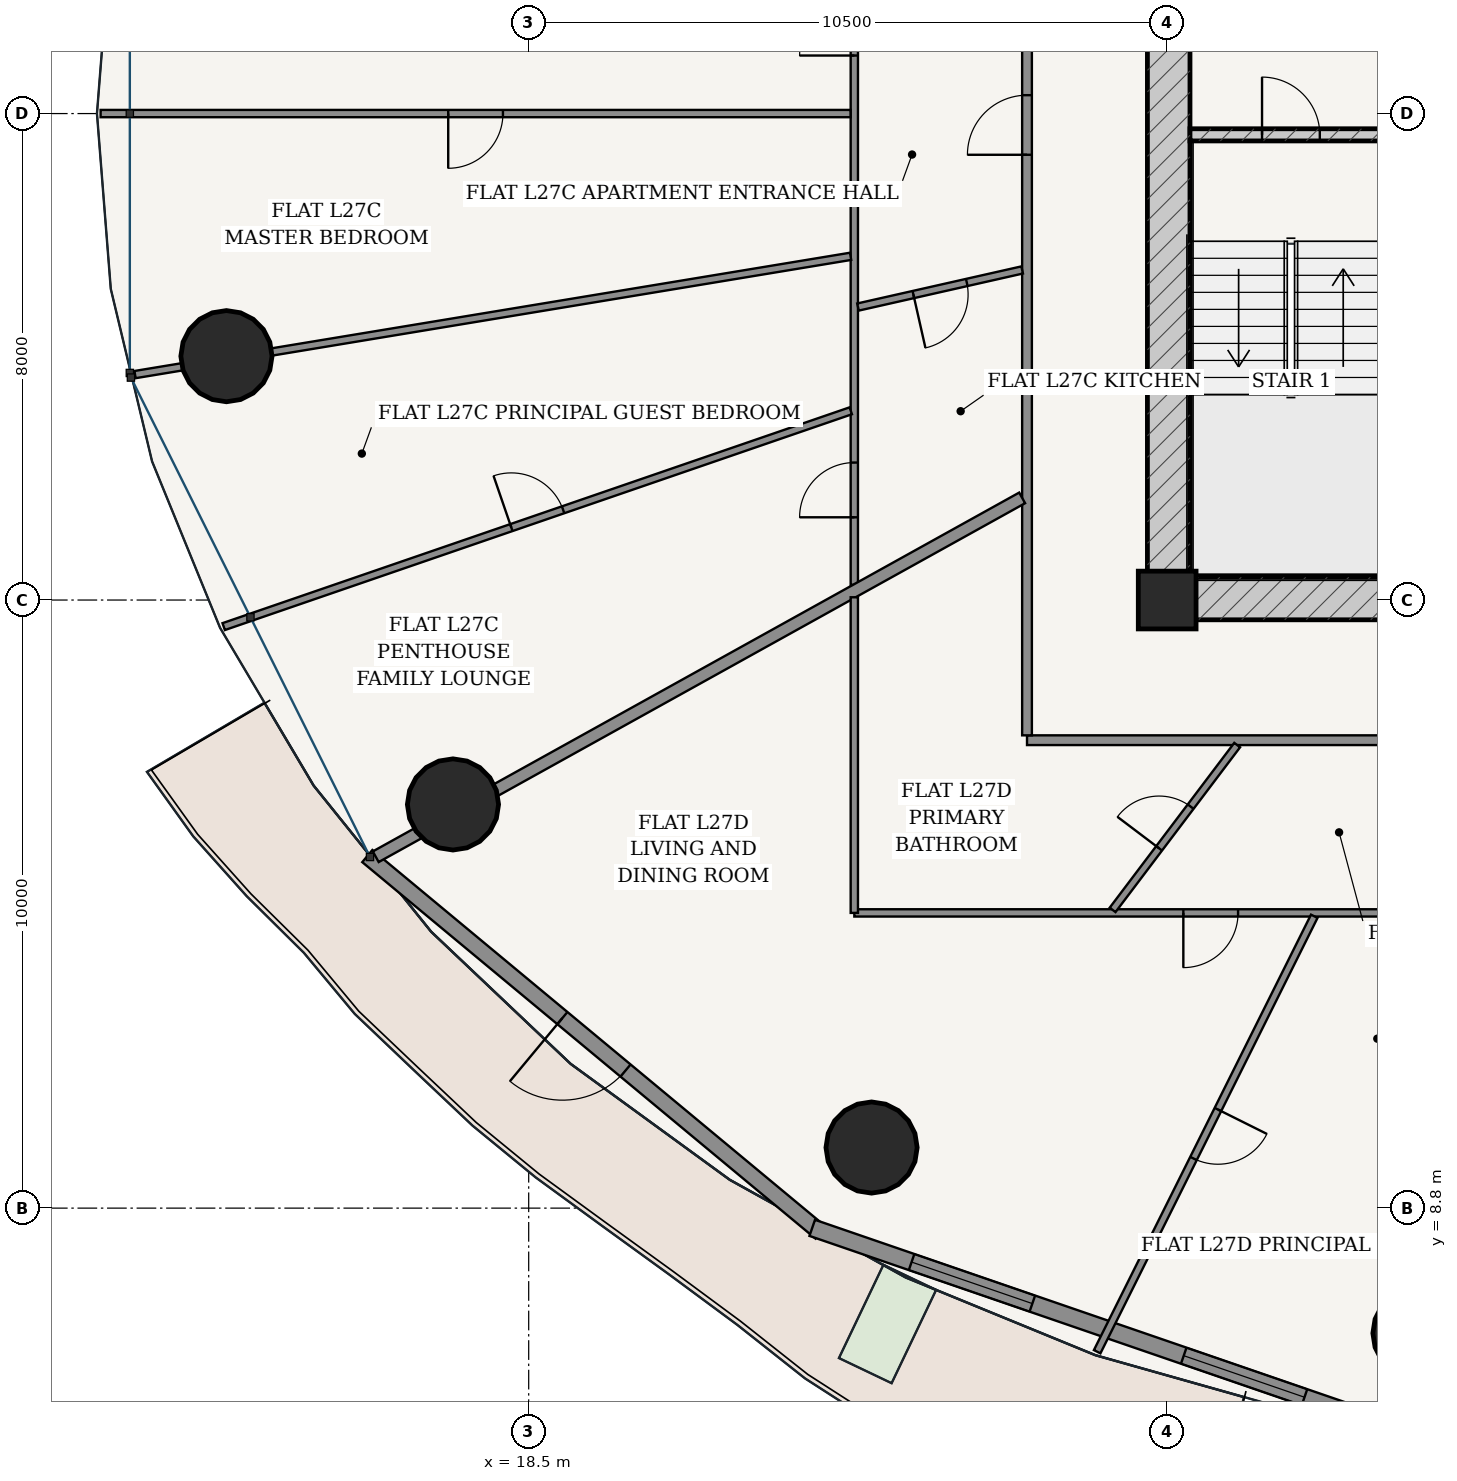
"""IFC4 building model, lengths in metres.
Left out: names, types, materials, properties, quantities, classifications, styles, units other than length and angle.
Written with IfcOpenShell. Run it as: python <this file> out.ifc"""

import sys

from ifc_helpers import new_model, si_unit, direction, frame, frame_2d, origin, origin_2d, place, context, subcontext, project, spatial, rectangle, hollow_circle, extrude, source, transform, mapped, element, fill, save


model = new_model("IFC4")
c1 = context("Model", 3, precision=1e-05, world=origin(), true_north=direction((-0.2419218956, 0.970295726276)))
c2 = subcontext(c1, "Body", "Model", "MODEL_VIEW")
j1 = project(units=[si_unit("LENGTHUNIT", "METRE"), si_unit("PLANEANGLEUNIT", "RADIAN")], contexts=[c1])
p1 = place(None, origin())
s1 = spatial("IfcSite", under=j1, at=p1, CompositionType="ELEMENT")
p2 = place(p1, origin())
s2 = spatial("IfcBuilding", under=s1, at=p2, CompositionType="ELEMENT")
p3 = place(p2, frame((0.0, 0.0, 105.0)))
s3 = spatial("IfcBuildingStorey", under=s2, at=p3, CompositionType="ELEMENT", Elevation=105.0)
p4 = place(p3, frame((29.0, 18.8, 0.0), z_axis=(0.0, 0.0, 1.0), x_axis=(1.0, 0.0, 0.0)))
e1 = element("IfcColumn", 1, at=p4, inside=s3, PredefinedType="COLUMN", context=c2, shape_type="SweptSolid", body=[
    extrude(rectangle(XDim=0.95, YDim=0.95, at=origin_2d()), origin(), (0.0, 0.0, 1.0), 3.6),
])
p5 = place(p3, frame((28.675, 18.825, 0.0), z_axis=(0.0, 0.0, 1.0), x_axis=(1.0, 0.0, 0.0)))
e2 = element("IfcWall", 2, at=p5, inside=s3, PredefinedType="SHEAR", context=c2, shape_type="SweptSolid", body=[
    extrude(rectangle(XDim=18.65, YDim=0.7, at=frame_2d((9.325, 0.0))), origin(), (0.0, 0.0, 1.0), 3.325),
])
p6 = place(p5, frame((6.877, 0.0, 0.0)))
e3 = element("IfcOpeningElement", 3, at=p6, cuts=e2, PredefinedType="OPENING", context=c2, shape_type="SweptSolid", body=[
    extrude(rectangle(XDim=0.85, YDim=2.1, at=frame_2d((0.425, 1.05))), frame((0.0, 0.36, 0.0), z_axis=(0.0, -1.0, 0.0), x_axis=(1.0, 0.0, 0.0)), (0.0, 0.0, 1.0), 0.72),
])
p7 = place(p5, frame((8.9, 0.0, 0.0)))
e4 = element("IfcOpeningElement", 4, at=p7, cuts=e2, PredefinedType="OPENING", context=c2, shape_type="SweptSolid", body=[
    extrude(rectangle(XDim=0.85, YDim=2.1, at=frame_2d((0.425, 1.05))), frame((0.0, 0.36, 0.0), z_axis=(0.0, -1.0, 0.0), x_axis=(1.0, 0.0, 0.0)), (0.0, 0.0, 1.0), 0.72),
])
p8 = place(p5, frame((10.923, 0.0, 0.0)))
e5 = element("IfcOpeningElement", 5, at=p8, cuts=e2, PredefinedType="OPENING", context=c2, shape_type="SweptSolid", body=[
    extrude(rectangle(XDim=0.85, YDim=2.1, at=frame_2d((0.425, 1.05))), frame((0.0, 0.36, 0.0), z_axis=(0.0, -1.0, 0.0), x_axis=(1.0, 0.0, 0.0)), (0.0, 0.0, 1.0), 0.72),
])
p9 = place(p3, frame((29.025, 19.175, 0.0), z_axis=(0.0, 0.0, 1.0), x_axis=(0.0, 1.0, 0.0)))
e6 = element("IfcWall", 6, at=p9, inside=s3, PredefinedType="SHEAR", context=c2, shape_type="SweptSolid", body=[
    extrude(rectangle(XDim=15.25, YDim=0.7, at=frame_2d((7.625, 0.0))), origin(), (0.0, 0.0, 1.0), 3.325),
])
p10 = place(p9, frame((9.875, 0.0, 0.0)))
e7 = element("IfcOpeningElement", 7, at=p10, cuts=e6, PredefinedType="OPENING", context=c2, shape_type="SweptSolid", body=[
    extrude(rectangle(XDim=1.5, YDim=2.2, at=frame_2d((0.75, 1.1))), frame((0.0, 0.36, 0.0), z_axis=(0.0, -1.0, 0.0), x_axis=(1.0, 0.0, 0.0)), (0.0, 0.0, 1.0), 0.72),
])
p11 = place(p3, frame((29.375, 26.45, 0.0), z_axis=(0.0, 0.0, 1.0), x_axis=(1.0, 0.0, 0.0)))
e8 = element("IfcWall", 8, at=p11, inside=s3, PredefinedType="SOLIDWALL", context=c2, shape_type="SweptSolid", body=[
    extrude(rectangle(XDim=3.32, YDim=0.2, at=frame_2d((1.66, 0.0))), origin(), (0.0, 0.0, 1.0), 3.325),
])
p12 = place(p11, frame((1.185, 0.0, 0.0)))
e9 = element("IfcOpeningElement", 9, at=p12, cuts=e8, PredefinedType="OPENING", context=c2, shape_type="SweptSolid", body=[
    extrude(rectangle(XDim=0.95, YDim=2.15, at=frame_2d((0.475, 1.075))), frame((0.0, 0.11, 0.0), z_axis=(0.0, -1.0, 0.0), x_axis=(1.0, 0.0, 0.0)), (0.0, 0.0, 1.0), 0.22),
])
for number, where, z_axis, x_axis in (
    (10, (13.529, 22.81, 0.0), (0.0, 0.0, 1.0), (1.0, 0.0, 0.0)),
    (11, (17.255, 15.438, 0.0), (0.0, 0.0, 1.0), (1.0, 0.0, 0.0)),
    (12, (24.138, 9.796, 0.0), (0.0, 0.0, 1.0), (1.0, 0.0, 0.0)),
    (13, (33.133, 6.743, 0.0), (0.0, 0.0, 1.0), (1.0, 0.0, 0.0)),
):
    element("IfcColumn", number, at=place(p3, frame(where, z_axis=z_axis, x_axis=x_axis)), inside=s3, PredefinedType="COLUMN", context=c2, shape_type="SweptSolid", body=[
        extrude(hollow_circle(Radius=0.75, WallThickness=0.045, at=origin_2d()), origin(), (0.0, 0.0, 1.0), 3.6),
    ])
p13 = place(p3, frame((15.846, 14.59, 0.0), z_axis=(0.0, 0.0, 1.0), x_axis=(0.769254958887, -0.638941944333, 0.0)))
e14 = element("IfcWall", 14, at=p13, inside=s3, PredefinedType="SOLIDWALL", context=c2, shape_type="SweptSolid", body=[
    extrude(rectangle(XDim=9.69, YDim=0.26, at=frame_2d((4.845, 0.0))), origin(), (0.0, 0.0, 1.0), 3.325),
])
p14 = place(p13, frame((4.17, 0.0, 0.0)))
e15 = element("IfcOpeningElement", 15, at=p14, cuts=e14, PredefinedType="OPENING", context=c2, shape_type="SweptSolid", body=[
    extrude(rectangle(XDim=1.35, YDim=2.2, at=frame_2d((0.675, 1.1))), frame((0.0, 0.14, 0.0), z_axis=(0.0, -1.0, 0.0), x_axis=(1.0, 0.0, 0.0)), (0.0, 0.0, 1.0), 0.28),
])
p15 = place(p3, frame((23.163, 8.476, 0.0), z_axis=(0.0, 0.0, 1.0), x_axis=(0.945590132341, -0.325360264351, 0.0)))
e16 = element("IfcWall", 16, at=p15, inside=s3, PredefinedType="SOLIDWALL", context=c2, shape_type="SweptSolid", body=[
    extrude(rectangle(XDim=10.289, YDim=0.28, at=frame_2d((5.145, 0.0))), origin(), (0.0, 0.0, 1.0), 3.325),
])
p16 = place(p15, frame((1.728, 0.0, 0.85)))
e17 = element("IfcOpeningElement", 17, at=p16, cuts=e16, PredefinedType="OPENING", context=c2, shape_type="SweptSolid", body=[
    extrude(rectangle(XDim=2.1, YDim=1.95, at=frame_2d((1.05, 0.975))), frame((0.0, 0.15, 0.0), z_axis=(0.0, -1.0, 0.0), x_axis=(1.0, 0.0, 0.0)), (0.0, 0.0, 1.0), 0.3),
])
p17 = place(p15, frame((6.461, 0.0, 0.85)))
e18 = element("IfcOpeningElement", 18, at=p17, cuts=e16, PredefinedType="OPENING", context=c2, shape_type="SweptSolid", body=[
    extrude(rectangle(XDim=2.1, YDim=1.95, at=frame_2d((1.05, 0.975))), frame((0.0, 0.15, 0.0), z_axis=(0.0, -1.0, 0.0), x_axis=(1.0, 0.0, 0.0)), (0.0, 0.0, 1.0), 0.3),
])
p18 = place(p3, frame((26.695, 16.495, 0.0), z_axis=(0.0, 0.0, 1.0), x_axis=(1.0, 0.0, 0.0)))
e19 = element("IfcWall", 19, at=p18, inside=s3, PredefinedType="PARTITIONING", context=c2, shape_type="SweptSolid", body=[
    extrude(rectangle(XDim=22.61, YDim=0.16, at=frame_2d((11.305, 0.0))), origin(), (0.0, 0.0, 1.0), 2.767),
])
p19 = place(p18, frame((6.974, 0.0, 0.0)))
e20 = element("IfcOpeningElement", 20, at=p19, cuts=e19, PredefinedType="OPENING", context=c2, shape_type="SweptSolid", body=[
    extrude(rectangle(XDim=0.98, YDim=2.2, at=frame_2d((0.49, 1.1))), frame((0.0, 0.09, 0.0), z_axis=(0.0, -1.0, 0.0), x_axis=(1.0, 0.0, 0.0)), (0.0, 0.0, 1.0), 0.18),
])
p20 = place(p18, frame((18.922, 0.0, 0.0)))
e21 = element("IfcOpeningElement", 21, at=p20, cuts=e19, PredefinedType="OPENING", context=c2, shape_type="SweptSolid", body=[
    extrude(rectangle(XDim=0.98, YDim=2.2, at=frame_2d((0.49, 1.1))), frame((0.0, 0.09, 0.0), z_axis=(0.0, -1.0, 0.0), x_axis=(1.0, 0.0, 0.0)), (0.0, 0.0, 1.0), 0.18),
])
p21 = place(p3, frame((26.695, 16.575, 0.0), z_axis=(0.0, 0.0, 1.0), x_axis=(0.0, 1.0, 0.0)))
e22 = element("IfcWall", 22, at=p21, inside=s3, PredefinedType="PARTITIONING", context=c2, shape_type="SweptSolid", body=[
    extrude(rectangle(XDim=20.45, YDim=0.16, at=frame_2d((10.225, 0.0))), origin(), (0.0, 0.0, 1.0), 2.767),
])
p22 = place(p21, frame((9.547, 0.0, 0.0)))
e23 = element("IfcOpeningElement", 23, at=p22, cuts=e22, PredefinedType="OPENING", context=c2, shape_type="SweptSolid", body=[
    extrude(rectangle(XDim=0.98, YDim=2.2, at=frame_2d((0.49, 1.1))), frame((0.0, 0.09, 0.0), z_axis=(0.0, -1.0, 0.0), x_axis=(1.0, 0.0, 0.0)), (0.0, 0.0, 1.0), 0.18),
])
p23 = place(p3, frame((23.855, 19.05, 0.0), z_axis=(0.0, 0.0, 1.0), x_axis=(0.0, 1.0, 0.0)))
e24 = element("IfcWall", 24, at=p23, inside=s3, PredefinedType="PARTITIONING", context=c2, shape_type="SweptSolid", body=[
    extrude(rectangle(XDim=15.501, YDim=0.12, at=frame_2d((7.75, 0.0))), origin(), (0.0, 0.0, 1.0), 2.767),
])
p24 = place(p23, frame((8.705, 0.0, 0.0)))
e25 = element("IfcOpeningElement", 25, at=p24, cuts=e24, PredefinedType="OPENING", context=c2, shape_type="SweptSolid", body=[
    extrude(rectangle(XDim=0.9, YDim=2.15, at=frame_2d((0.45, 1.075))), frame((0.0, 0.07, 0.0), z_axis=(0.0, -1.0, 0.0), x_axis=(1.0, 0.0, 0.0)), (0.0, 0.0, 1.0), 0.14),
])
p25 = place(p23, frame((1.111, 0.0, 0.0)))
e26 = element("IfcOpeningElement", 26, at=p25, cuts=e24, PredefinedType="OPENING", context=c2, shape_type="SweptSolid", body=[
    extrude(rectangle(XDim=0.9, YDim=2.15, at=frame_2d((0.45, 1.075))), frame((0.0, 0.07, 0.0), z_axis=(0.0, -1.0, 0.0), x_axis=(1.0, 0.0, 0.0)), (0.0, 0.0, 1.0), 0.14),
])
p26 = place(p3, frame((23.793, 26.8, 0.0), z_axis=(0.0, 0.0, 1.0), x_axis=(-1.0, 0.0, 0.0)))
e27 = element("IfcWall", 27, at=p26, inside=s3, PredefinedType="PARTITIONING", context=c2, shape_type="SweptSolid", body=[
    extrude(rectangle(XDim=12.333, YDim=0.12, at=frame_2d((6.167, 0.0))), origin(), (0.0, 0.0, 1.0), 2.767),
])
p27 = place(p26, frame((5.717, 0.0, 0.0)))
e28 = element("IfcOpeningElement", 28, at=p27, cuts=e27, PredefinedType="OPENING", context=c2, shape_type="SweptSolid", body=[
    extrude(rectangle(XDim=0.9, YDim=2.15, at=frame_2d((0.45, 1.075))), frame((0.0, 0.07, 0.0), z_axis=(0.0, -1.0, 0.0), x_axis=(1.0, 0.0, 0.0)), (0.0, 0.0, 1.0), 0.14),
])
p28 = place(p3, frame((23.794, 24.452, 0.0), z_axis=(0.0, 0.0, 1.0), x_axis=(-0.986620350945, -0.163034607068, 0.0)))
e29 = element("IfcWall", 29, at=p28, inside=s3, PredefinedType="PARTITIONING", context=c2, shape_type="SweptSolid", body=[
    extrude(rectangle(XDim=11.927, YDim=0.12, at=frame_2d((5.964, 0.0))), origin(), (0.0, 0.0, 1.0), 2.767),
])
p29 = place(p3, frame((23.796, 21.912, 0.0), z_axis=(0.0, 0.0, 1.0), x_axis=(-0.945574063861, -0.325406960209, 0.0)))
e30 = element("IfcWall", 30, at=p29, inside=s3, PredefinedType="PARTITIONING", context=c2, shape_type="SweptSolid", body=[
    extrude(rectangle(XDim=10.906, YDim=0.12, at=frame_2d((5.453, 0.0))), origin(), (0.0, 0.0, 1.0), 2.767),
])
p30 = place(p29, frame((5.003, 0.0, 0.0)))
e31 = element("IfcOpeningElement", 31, at=p30, cuts=e30, PredefinedType="OPENING", context=c2, shape_type="SweptSolid", body=[
    extrude(rectangle(XDim=0.9, YDim=2.15, at=frame_2d((0.45, 1.075))), frame((0.0, 0.07, 0.0), z_axis=(0.0, -1.0, 0.0), x_axis=(1.0, 0.0, 0.0)), (0.0, 0.0, 1.0), 0.14),
])
p31 = place(p3, frame((26.615, 24.228, 0.0), z_axis=(0.0, 0.0, 1.0), x_axis=(-0.975417151515, -0.220366468706, 0.0)))
e32 = element("IfcWall", 32, at=p31, inside=s3, PredefinedType="PARTITIONING", context=c2, shape_type="SweptSolid", body=[
    extrude(rectangle(XDim=2.768, YDim=0.12, at=frame_2d((1.384, 0.0))), origin(), (0.0, 0.0, 1.0), 3.325),
])
p32 = place(p31, frame((0.934, 0.0, 0.0)))
e33 = element("IfcOpeningElement", 33, at=p32, cuts=e32, PredefinedType="OPENING", context=c2, shape_type="SweptSolid", body=[
    extrude(rectangle(XDim=0.9, YDim=2.15, at=frame_2d((0.45, 1.075))), frame((0.0, 0.07, 0.0), z_axis=(0.0, -1.0, 0.0), x_axis=(1.0, 0.0, 0.0)), (0.0, 0.0, 1.0), 0.14),
])
p33 = place(p3, frame((26.615, 20.48, 0.0), z_axis=(0.0, 0.0, 1.0), x_axis=(-0.874310671773, -0.48536671623, 0.0)))
e34 = element("IfcWall", 34, at=p33, inside=s3, PredefinedType="PARTITIONING", context=c2, shape_type="SweptSolid", body=[
    extrude(rectangle(XDim=12.159, YDim=0.2, at=frame_2d((6.079, 0.0))), origin(), (0.0, 0.0, 1.0), 2.767),
])
p34 = place(p3, frame((44.451, 13.655, 0.0), z_axis=(0.0, 0.0, 1.0), x_axis=(-1.0, 0.0, 0.0)))
e35 = element("IfcWall", 35, at=p34, inside=s3, PredefinedType="PARTITIONING", context=c2, shape_type="SweptSolid", body=[
    extrude(rectangle(XDim=20.596, YDim=0.12, at=frame_2d((10.298, 0.0))), origin(), (0.0, 0.0, 1.0), 2.767),
])
p35 = place(p34, frame((14.286, 0.0, 0.0)))
e36 = element("IfcOpeningElement", 36, at=p35, cuts=e35, PredefinedType="OPENING", context=c2, shape_type="SweptSolid", body=[
    extrude(rectangle(XDim=0.9, YDim=2.15, at=frame_2d((0.45, 1.075))), frame((0.0, 0.07, 0.0), z_axis=(0.0, -1.0, 0.0), x_axis=(1.0, 0.0, 0.0)), (0.0, 0.0, 1.0), 0.14),
])
p36 = place(p34, frame((2.815, 0.0, 0.0)))
e37 = element("IfcOpeningElement", 37, at=p36, cuts=e35, PredefinedType="OPENING", context=c2, shape_type="SweptSolid", body=[
    extrude(rectangle(XDim=0.9, YDim=2.15, at=frame_2d((0.45, 1.075))), frame((0.0, 0.07, 0.0), z_axis=(0.0, -1.0, 0.0), x_axis=(1.0, 0.0, 0.0)), (0.0, 0.0, 1.0), 0.14),
])
p37 = place(p3, frame((23.855, 13.655, 0.0), z_axis=(0.0, 0.0, 1.0), x_axis=(0.0, 1.0, 0.0)))
e38 = element("IfcWall", 38, at=p37, inside=s3, PredefinedType="PARTITIONING", context=c2, shape_type="SweptSolid", body=[
    extrude(rectangle(XDim=5.19, YDim=0.12, at=frame_2d((2.595, 0.0))), origin(), (0.0, 0.0, 1.0), 3.004),
])
p38 = place(p3, frame((31.419, 13.6, 0.0), z_axis=(0.0, 0.0, 1.0), x_axis=(-0.446188142997, -0.894939182877, 0.0)))
e39 = element("IfcWall", 39, at=p38, inside=s3, PredefinedType="PARTITIONING", context=c2, shape_type="SweptSolid", body=[
    extrude(rectangle(XDim=8.002, YDim=0.12, at=frame_2d((4.001, 0.0))), origin(), (0.0, 0.0, 1.0), 2.767),
])
p39 = place(p38, frame((3.551, 0.0, 0.0)))
e40 = element("IfcOpeningElement", 40, at=p39, cuts=e39, PredefinedType="OPENING", context=c2, shape_type="SweptSolid", body=[
    extrude(rectangle(XDim=0.9, YDim=2.15, at=frame_2d((0.45, 1.075))), frame((0.0, 0.07, 0.0), z_axis=(0.0, -1.0, 0.0), x_axis=(1.0, 0.0, 0.0)), (0.0, 0.0, 1.0), 0.14),
])
p40 = place(p3, frame((30.151, 16.415, 0.0), z_axis=(0.0, 0.0, 1.0), x_axis=(-0.602927617913, -0.79779589342, 0.0)))
e41 = element("IfcWall", 41, at=p40, inside=s3, PredefinedType="PARTITIONING", context=c2, shape_type="SweptSolid", body=[
    extrude(rectangle(XDim=3.398, YDim=0.12, at=frame_2d((1.699, 0.0))), origin(), (0.0, 0.0, 1.0), 3.004),
])
p41 = place(p40, frame((1.269, 0.0, 0.0)))
e42 = element("IfcOpeningElement", 42, at=p41, cuts=e41, PredefinedType="OPENING", context=c2, shape_type="SweptSolid", body=[
    extrude(rectangle(XDim=0.86, YDim=2.15, at=frame_2d((0.43, 1.075))), frame((0.0, 0.07, 0.0), z_axis=(0.0, -1.0, 0.0), x_axis=(1.0, 0.0, 0.0)), (0.0, 0.0, 1.0), 0.14),
])
m1 = source(origin(), c2, "Body", "SweptSolid", [
    extrude(rectangle(XDim=1.35, YDim=2.2, at=frame_2d((0.675, 1.1))), frame((0.0, 0.025, 0.0), z_axis=(0.0, -1.0, 0.0), x_axis=(1.0, 0.0, 0.0)), (0.0, 0.0, 1.0), 0.05),
])
p42 = place(p14, frame((1.35, 0.0, 0.0), z_axis=(0.0, 0.0, 1.0), x_axis=(-1.0, 0.0, 0.0)))
e43 = element("IfcDoor", 43, at=p42, inside=s3, OperationType="SINGLE_SWING_RIGHT", PredefinedType="DOOR", context=c2, shape_type="MappedRepresentation", body=[
    mapped(m1, transform((0.0, 0.0, 0.0), scale=1.0)),
])
fill(e15, e43)
m2 = source(origin(), c2, "Body", "SweptSolid", [
    extrude(rectangle(XDim=2.1, YDim=1.95, at=frame_2d((1.05, 0.975))), frame((0.0, 0.03, 0.0), z_axis=(0.0, -1.0, 0.0), x_axis=(1.0, 0.0, 0.0)), (0.0, 0.0, 1.0), 0.06),
])
p43 = place(p16, origin())
e44 = element("IfcWindow", 44, at=p43, inside=s3, PartitioningType="SINGLE_PANEL", PredefinedType="WINDOW", context=c2, shape_type="MappedRepresentation", body=[
    mapped(m2, transform((0.0, 0.0, 0.0), scale=1.0)),
])
fill(e17, e44)
p44 = place(p17, origin())
e45 = element("IfcWindow", 45, at=p44, inside=s3, PartitioningType="SINGLE_PANEL", PredefinedType="WINDOW", context=c2, shape_type="MappedRepresentation", body=[
    mapped(m2, transform((0.0, 0.0, 0.0), scale=1.0)),
])
fill(e18, e45)
m3 = source(origin(), c2, "Body", "SweptSolid", [
    extrude(rectangle(XDim=0.95, YDim=2.15, at=frame_2d((0.475, 1.075))), frame((0.0, 0.025, 0.0), z_axis=(0.0, -1.0, 0.0), x_axis=(1.0, 0.0, 0.0)), (0.0, 0.0, 1.0), 0.05),
])
p45 = place(p12, origin())
e46 = element("IfcDoor", 46, at=p45, inside=s3, OperationType="SINGLE_SWING_LEFT", PredefinedType="DOOR", context=c2, shape_type="MappedRepresentation", body=[
    mapped(m3, transform((0.0, 0.0, 0.0), scale=1.0)),
])
fill(e9, e46)
m4 = source(origin(), c2, "Body", "SweptSolid", [
    extrude(rectangle(XDim=0.98, YDim=2.2, at=frame_2d((0.49, 1.1))), frame((0.0, 0.025, 0.0), z_axis=(0.0, -1.0, 0.0), x_axis=(1.0, 0.0, 0.0)), (0.0, 0.0, 1.0), 0.05),
])
p46 = place(p22, origin())
e47 = element("IfcDoor", 47, at=p46, inside=s3, OperationType="SINGLE_SWING_LEFT", PredefinedType="DOOR", context=c2, shape_type="MappedRepresentation", body=[
    mapped(m4, transform((0.0, 0.0, 0.0), scale=1.0)),
])
fill(e23, e47)
m5 = source(origin(), c2, "Body", "SweptSolid", [
    extrude(rectangle(XDim=0.9, YDim=2.15, at=frame_2d((0.45, 1.075))), frame((0.0, 0.025, 0.0), z_axis=(0.0, -1.0, 0.0), x_axis=(1.0, 0.0, 0.0)), (0.0, 0.0, 1.0), 0.05),
])
p47 = place(p24, origin())
e48 = element("IfcDoor", 48, at=p47, inside=s3, OperationType="SINGLE_SWING_LEFT", PredefinedType="DOOR", context=c2, shape_type="MappedRepresentation", body=[
    mapped(m5, transform((0.0, 0.0, 0.0), scale=1.0)),
])
fill(e25, e48)
p48 = place(p32, origin())
e49 = element("IfcDoor", 49, at=p48, inside=s3, OperationType="SINGLE_SWING_RIGHT", PredefinedType="DOOR", context=c2, shape_type="MappedRepresentation", body=[
    mapped(m5, transform((0.0, 0.0, 0.0), scale=1.0)),
])
fill(e33, e49)
p49 = place(p25, origin())
e50 = element("IfcDoor", 50, at=p49, inside=s3, OperationType="SINGLE_SWING_LEFT", PredefinedType="DOOR", context=c2, shape_type="MappedRepresentation", body=[
    mapped(m5, transform((0.0, 0.0, 0.0), scale=1.0)),
])
fill(e26, e50)
p50 = place(p27, origin())
e51 = element("IfcDoor", 51, at=p50, inside=s3, OperationType="SINGLE_SWING_RIGHT", PredefinedType="DOOR", context=c2, shape_type="MappedRepresentation", body=[
    mapped(m5, transform((0.0, 0.0, 0.0), scale=1.0)),
])
fill(e28, e51)
p51 = place(p30, frame((0.9, 0.0, 0.0), z_axis=(0.0, 0.0, 1.0), x_axis=(-1.0, 0.0, 0.0)))
e52 = element("IfcDoor", 52, at=p51, inside=s3, OperationType="SINGLE_SWING_LEFT", PredefinedType="DOOR", context=c2, shape_type="MappedRepresentation", body=[
    mapped(m5, transform((0.0, 0.0, 0.0), scale=1.0)),
])
fill(e31, e52)
m6 = source(origin(), c2, "Body", "SweptSolid", [
    extrude(rectangle(XDim=0.86, YDim=2.15, at=frame_2d((0.43, 1.075))), frame((0.0, 0.025, 0.0), z_axis=(0.0, -1.0, 0.0), x_axis=(1.0, 0.0, 0.0)), (0.0, 0.0, 1.0), 0.05),
])
p52 = place(p41, frame((0.86, 0.0, 0.0), z_axis=(0.0, 0.0, 1.0), x_axis=(-1.0, 0.0, 0.0)))
e53 = element("IfcDoor", 53, at=p52, inside=s3, OperationType="SINGLE_SWING_LEFT", PredefinedType="DOOR", context=c2, shape_type="MappedRepresentation", body=[
    mapped(m6, transform((0.0, 0.0, 0.0), scale=1.0)),
])
fill(e42, e53)
p53 = place(p35, origin())
e54 = element("IfcDoor", 54, at=p53, inside=s3, OperationType="SINGLE_SWING_RIGHT", PredefinedType="DOOR", context=c2, shape_type="MappedRepresentation", body=[
    mapped(m5, transform((0.0, 0.0, 0.0), scale=1.0)),
])
fill(e36, e54)
p54 = place(p39, origin())
e55 = element("IfcDoor", 55, at=p54, inside=s3, OperationType="SINGLE_SWING_LEFT", PredefinedType="DOOR", context=c2, shape_type="MappedRepresentation", body=[
    mapped(m5, transform((0.0, 0.0, 0.0), scale=1.0)),
])
fill(e40, e55)
save(model, sys.argv[1])
